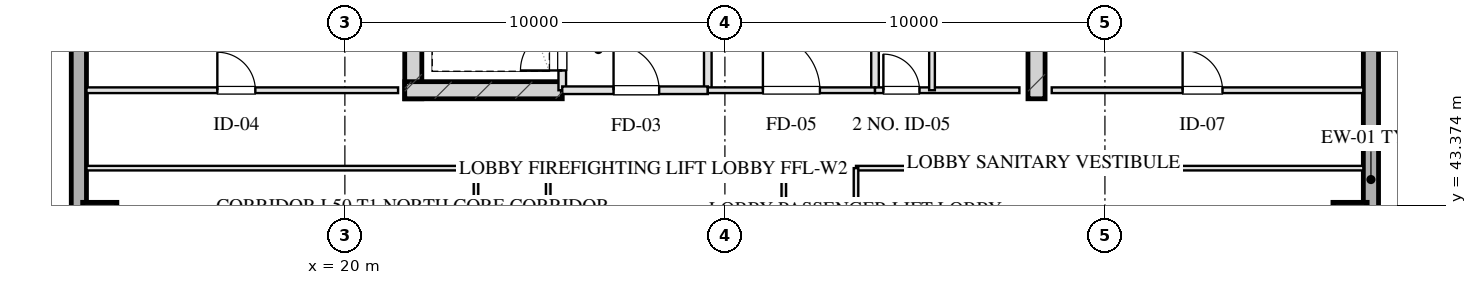
"""IFC4 building model, lengths in metres.
Left out: names, types, materials, properties, quantities, classifications, styles, units other than length and angle.
Written with IfcOpenShell. Run it as: python <this file> out.ifc"""

import sys

from ifc_helpers import new_model, si_unit, direction, frame, frame_2d, origin, origin_2d, place, context, subcontext, project, spatial, rectangle, hollow_rectangle, extrude, element, fill, save


model = new_model("IFC4")
c1 = context("Model", 3, precision=1e-05, world=origin(), true_north=direction((0.0, 1.0)))
c2 = subcontext(c1, "Body", "Model", "MODEL_VIEW")
j1 = project(units=[si_unit("LENGTHUNIT", "METRE"), si_unit("PLANEANGLEUNIT", "RADIAN")], contexts=[c1])
p1 = place(None, origin())
s1 = spatial("IfcSite", under=j1, at=p1, CompositionType="ELEMENT")
p2 = place(p1, origin())
s2 = spatial("IfcBuilding", under=s1, at=p2, CompositionType="ELEMENT")
p3 = place(p2, frame((0.0, 0.0, 188.6)))
s3 = spatial("IfcBuildingStorey", under=s2, at=p3, CompositionType="ELEMENT", Elevation=188.6)
for number, where, z_axis, x_axis in (
    (1, (21.8, 46.175, 0.0), (0.0, 0.0, 1.0), (0.0, 1.0, 0.0)),
    (2, (38.2, 46.175, 0.0), (0.0, 0.0, 1.0), (0.0, 1.0, 0.0)),
):
    element("IfcWall", number, at=place(p3, frame(where, z_axis=z_axis, x_axis=x_axis)), inside=s3, PredefinedType="SHEAR", context=c2, shape_type="SweptSolid", body=[
        extrude(rectangle(XDim=9.33, YDim=0.45, at=frame_2d((4.665, 0.0))), origin(), (0.0, 0.0, 1.0), 3.45),
    ])
p4 = place(p3, frame((21.575, 46.4, 0.0), z_axis=(0.0, 0.0, 1.0), x_axis=(1.0, 0.0, 0.0)))
e3 = element("IfcWall", 3, at=p4, inside=s3, PredefinedType="SHEAR", context=c2, shape_type="SweptSolid", body=[
    extrude(rectangle(XDim=4.145, YDim=0.45, at=frame_2d((2.073, 0.0))), origin(), (0.0, 0.0, 1.0), 3.45),
])
for number, where, z_axis, x_axis in (
    (4, (13.55, 43.0, 0.0), (0.0, 0.0, 1.0), (1.0, 0.0, 0.0)),
    (5, (46.45, 43.0, 0.0), (0.0, 0.0, 1.0), (1.0, 0.0, 0.0)),
):
    element("IfcColumn", number, at=place(p3, frame(where, z_axis=z_axis, x_axis=x_axis)), inside=s3, PredefinedType="COLUMN", context=c2, shape_type="SweptSolid", body=[
        extrude(hollow_rectangle(XDim=0.9, YDim=0.9, WallThickness=0.032, at=origin_2d()), origin(), (0.0, 0.0, 1.0), 3.451),
    ])
p5 = place(p3, frame((13.0, 10.8, 0.0), z_axis=(0.0, 0.0, 1.0), x_axis=(0.0, 1.0, 0.0)))
e6 = element("IfcWall", 6, at=p5, inside=s3, PredefinedType="SOLIDWALL", context=c2, shape_type="SweptSolid", body=[
    extrude(rectangle(XDim=46.4, YDim=0.4, at=frame_2d((23.2, 0.0))), origin(), (0.0, 0.0, 1.0), 2.61),
])
p6 = place(p5, frame((24.75, 0.0, 0.75)))
e7 = element("IfcOpeningElement", 7, at=p6, cuts=e6, PredefinedType="OPENING", context=c2, shape_type="SweptSolid", body=[
    extrude(rectangle(XDim=2.1, YDim=1.46, at=frame_2d((1.05, 0.73))), frame((0.0, 0.21, 0.0), z_axis=(0.0, -1.0, 0.0), x_axis=(1.0, 0.0, 0.0)), (0.0, 0.0, 1.0), 0.42),
])
p7 = place(p5, frame((28.55, 0.0, 0.75)))
e8 = element("IfcOpeningElement", 8, at=p7, cuts=e6, PredefinedType="OPENING", context=c2, shape_type="SweptSolid", body=[
    extrude(rectangle(XDim=2.1, YDim=1.46, at=frame_2d((1.05, 0.73))), frame((0.0, 0.21, 0.0), z_axis=(0.0, -1.0, 0.0), x_axis=(1.0, 0.0, 0.0)), (0.0, 0.0, 1.0), 0.42),
])
p8 = place(p5, frame((19.55, 0.0, 0.0)))
e9 = element("IfcOpeningElement", 9, at=p8, cuts=e6, PredefinedType="OPENING", context=c2, shape_type="SweptSolid", body=[
    extrude(rectangle(XDim=1.1, YDim=2.15, at=frame_2d((0.55, 1.075))), frame((0.0, 0.21, 0.0), z_axis=(0.0, -1.0, 0.0), x_axis=(1.0, 0.0, 0.0)), (0.0, 0.0, 1.0), 0.42),
])
p9 = place(p3, frame((47.0, 57.2, 0.0), z_axis=(0.0, 0.0, 1.0), x_axis=(0.0, -1.0, 0.0)))
e10 = element("IfcWall", 10, at=p9, inside=s3, PredefinedType="SOLIDWALL", context=c2, shape_type="SweptSolid", body=[
    extrude(rectangle(XDim=46.4, YDim=0.4, at=frame_2d((23.2, 0.0))), origin(), (0.0, 0.0, 1.0), 2.61),
])
p10 = place(p9, frame((19.55, 0.0, 0.75)))
e11 = element("IfcOpeningElement", 11, at=p10, cuts=e10, PredefinedType="OPENING", context=c2, shape_type="SweptSolid", body=[
    extrude(rectangle(XDim=2.1, YDim=1.46, at=frame_2d((1.05, 0.73))), frame((0.0, 0.21, 0.0), z_axis=(0.0, -1.0, 0.0), x_axis=(1.0, 0.0, 0.0)), (0.0, 0.0, 1.0), 0.42),
])
p11 = place(p9, frame((15.75, 0.0, 0.75)))
e12 = element("IfcOpeningElement", 12, at=p11, cuts=e10, PredefinedType="OPENING", context=c2, shape_type="SweptSolid", body=[
    extrude(rectangle(XDim=2.1, YDim=1.46, at=frame_2d((1.05, 0.73))), frame((0.0, 0.21, 0.0), z_axis=(0.0, -1.0, 0.0), x_axis=(1.0, 0.0, 0.0)), (0.0, 0.0, 1.0), 0.42),
])
p12 = place(p9, frame((27.05, 0.0, 0.0)))
e13 = element("IfcOpeningElement", 13, at=p12, cuts=e10, PredefinedType="OPENING", context=c2, shape_type="SweptSolid", body=[
    extrude(rectangle(XDim=1.1, YDim=2.15, at=frame_2d((0.55, 1.075))), frame((0.0, 0.21, 0.0), z_axis=(0.0, -1.0, 0.0), x_axis=(1.0, 0.0, 0.0)), (0.0, 0.0, 1.0), 0.42),
])
p13 = place(p3, frame((25.72, 46.4, 0.0), z_axis=(0.0, 0.0, 1.0), x_axis=(0.0, 1.0, 0.0)))
e14 = element("IfcWall", 14, at=p13, inside=s3, PredefinedType="PARTITIONING", context=c2, shape_type="SweptSolid", body=[
    extrude(rectangle(XDim=1.9, YDim=0.2, at=frame_2d((0.95, 0.0))), origin(), (0.0, 0.0, 1.0), 3.175),
])
p14 = place(p13, frame((0.52, 0.0, 0.0)))
e15 = element("IfcOpeningElement", 15, at=p14, cuts=e14, PredefinedType="OPENING", context=c2, shape_type="SweptSolid", body=[
    extrude(rectangle(XDim=1.1, YDim=2.05, at=frame_2d((0.55, 1.025))), frame((0.0, 0.11, 0.0), z_axis=(0.0, -1.0, 0.0), x_axis=(1.0, 0.0, 0.0)), (0.0, 0.0, 1.0), 0.22),
])
p15 = place(p3, frame((29.55, 46.4, 0.0), z_axis=(0.0, 0.0, 1.0), x_axis=(0.0, 1.0, 0.0)))
e16 = element("IfcWall", 16, at=p15, inside=s3, PredefinedType="PARTITIONING", context=c2, shape_type="SweptSolid", body=[
    extrude(rectangle(XDim=8.43, YDim=0.2, at=frame_2d((4.215, 0.0))), origin(), (0.0, 0.0, 1.0), 3.175),
])
p16 = place(p3, frame((25.72, 46.4, 0.0), z_axis=(0.0, 0.0, 1.0), x_axis=(1.0, 0.0, 0.0)))
e17 = element("IfcWall", 17, at=p16, inside=s3, PredefinedType="PARTITIONING", context=c2, shape_type="SweptSolid", body=[
    extrude(rectangle(XDim=3.83, YDim=0.2, at=frame_2d((1.915, 0.0))), origin(), (0.0, 0.0, 1.0), 3.175),
])
p17 = place(p16, frame((1.35, 0.0, 0.0)))
e18 = element("IfcOpeningElement", 18, at=p17, cuts=e17, PredefinedType="OPENING", context=c2, shape_type="SweptSolid", body=[
    extrude(rectangle(XDim=1.2, YDim=2.05, at=frame_2d((0.6, 1.025))), frame((0.0, 0.11, 0.0), z_axis=(0.0, -1.0, 0.0), x_axis=(1.0, 0.0, 0.0)), (0.0, 0.0, 1.0), 0.22),
])
p18 = place(p3, frame((33.95, 46.4, 0.0), z_axis=(0.0, 0.0, 1.0), x_axis=(0.0, 1.0, 0.0)))
e19 = element("IfcWall", 19, at=p18, inside=s3, PredefinedType="PARTITIONING", context=c2, shape_type="SweptSolid", body=[
    extrude(rectangle(XDim=8.43, YDim=0.2, at=frame_2d((4.215, 0.0))), origin(), (0.0, 0.0, 1.0), 3.175),
])
p19 = place(p3, frame((29.55, 46.4, 0.0), z_axis=(0.0, 0.0, 1.0), x_axis=(1.0, 0.0, 0.0)))
e20 = element("IfcWall", 20, at=p19, inside=s3, PredefinedType="PARTITIONING", context=c2, shape_type="SweptSolid", body=[
    extrude(rectangle(XDim=4.4, YDim=0.15, at=frame_2d((2.2, 0.0))), origin(), (0.0, 0.0, 1.0), 3.175),
])
p20 = place(p19, frame((1.45, 0.0, 0.0)))
e21 = element("IfcOpeningElement", 21, at=p20, cuts=e20, PredefinedType="OPENING", context=c2, shape_type="SweptSolid", body=[
    extrude(rectangle(XDim=1.5, YDim=2.05, at=frame_2d((0.75, 1.025))), frame((0.0, 0.085, 0.0), z_axis=(0.0, -1.0, 0.0), x_axis=(1.0, 0.0, 0.0)), (0.0, 0.0, 1.0), 0.17),
])
p21 = place(p3, frame((33.95, 46.4, 0.0), z_axis=(0.0, 0.0, 1.0), x_axis=(1.0, 0.0, 0.0)))
e22 = element("IfcWall", 22, at=p21, inside=s3, PredefinedType="PARTITIONING", context=c2, shape_type="SweptSolid", body=[
    extrude(rectangle(XDim=3.8, YDim=0.15, at=frame_2d((1.9, 0.0))), origin(), (0.0, 0.0, 1.0), 3.175),
])
p22 = place(p21, frame((0.22, 0.0, 0.0)))
e23 = element("IfcOpeningElement", 23, at=p22, cuts=e22, PredefinedType="OPENING", context=c2, shape_type="SweptSolid", body=[
    extrude(rectangle(XDim=0.95, YDim=2.05, at=frame_2d((0.475, 1.025))), frame((0.0, 0.085, 0.0), z_axis=(0.0, -1.0, 0.0), x_axis=(1.0, 0.0, 0.0)), (0.0, 0.0, 1.0), 0.17),
])
p23 = place(p3, frame((35.45, 46.4, 0.0), z_axis=(0.0, 0.0, 1.0), x_axis=(0.0, 1.0, 0.0)))
e24 = element("IfcWall", 24, at=p23, inside=s3, PredefinedType="PARTITIONING", context=c2, shape_type="SweptSolid", body=[
    extrude(rectangle(XDim=8.43, YDim=0.15, at=frame_2d((4.215, 0.0))), origin(), (0.0, 0.0, 1.0), 2.765),
])
p24 = place(p23, frame((2.55, 0.0, 0.0)))
e25 = element("IfcOpeningElement", 25, at=p24, cuts=e24, PredefinedType="OPENING", context=c2, shape_type="SweptSolid", body=[
    extrude(rectangle(XDim=0.95, YDim=2.05, at=frame_2d((0.475, 1.025))), frame((0.0, 0.085, 0.0), z_axis=(0.0, -1.0, 0.0), x_axis=(1.0, 0.0, 0.0)), (0.0, 0.0, 1.0), 0.17),
])
p25 = place(p23, frame((4.7, 0.0, 0.0)))
e26 = element("IfcOpeningElement", 26, at=p25, cuts=e24, PredefinedType="OPENING", context=c2, shape_type="SweptSolid", body=[
    extrude(rectangle(XDim=0.9, YDim=2.05, at=frame_2d((0.45, 1.025))), frame((0.0, 0.085, 0.0), z_axis=(0.0, -1.0, 0.0), x_axis=(1.0, 0.0, 0.0)), (0.0, 0.0, 1.0), 0.17),
])
p26 = place(p23, frame((6.8, 0.0, 0.0)))
e27 = element("IfcOpeningElement", 27, at=p26, cuts=e24, PredefinedType="OPENING", context=c2, shape_type="SweptSolid", body=[
    extrude(rectangle(XDim=0.9, YDim=2.05, at=frame_2d((0.45, 1.025))), frame((0.0, 0.085, 0.0), z_axis=(0.0, -1.0, 0.0), x_axis=(1.0, 0.0, 0.0)), (0.0, 0.0, 1.0), 0.17),
])
p27 = place(p3, frame((13.2, 46.4, 0.0), z_axis=(0.0, 0.0, 1.0), x_axis=(1.0, 0.0, 0.0)))
e28 = element("IfcWall", 28, at=p27, inside=s3, PredefinedType="PARTITIONING", context=c2, shape_type="SweptSolid", body=[
    extrude(rectangle(XDim=8.2, YDim=0.15, at=frame_2d((4.1, 0.0))), origin(), (0.0, 0.0, 1.0), 3.175),
])
p28 = place(p27, frame((3.444, 0.0, 0.0)))
e29 = element("IfcOpeningElement", 29, at=p28, cuts=e28, PredefinedType="OPENING", context=c2, shape_type="SweptSolid", body=[
    extrude(rectangle(XDim=1.0, YDim=2.05, at=frame_2d((0.5, 1.025))), frame((0.0, 0.085, 0.0), z_axis=(0.0, -1.0, 0.0), x_axis=(1.0, 0.0, 0.0)), (0.0, 0.0, 1.0), 0.17),
])
p29 = place(p3, frame((38.6, 46.4, 0.0), z_axis=(0.0, 0.0, 1.0), x_axis=(1.0, 0.0, 0.0)))
e30 = element("IfcWall", 30, at=p29, inside=s3, PredefinedType="PARTITIONING", context=c2, shape_type="SweptSolid", body=[
    extrude(rectangle(XDim=8.2, YDim=0.15, at=frame_2d((4.1, 0.0))), origin(), (0.0, 0.0, 1.0), 3.175),
])
p30 = place(p29, frame((3.444, 0.0, 0.0)))
e31 = element("IfcOpeningElement", 31, at=p30, cuts=e30, PredefinedType="OPENING", context=c2, shape_type="SweptSolid", body=[
    extrude(rectangle(XDim=1.05, YDim=2.05, at=frame_2d((0.525, 1.025))), frame((0.0, 0.085, 0.0), z_axis=(0.0, -1.0, 0.0), x_axis=(1.0, 0.0, 0.0)), (0.0, 0.0, 1.0), 0.17),
])
p31 = place(p3, frame((13.2, 44.35, 0.0), z_axis=(0.0, 0.0, 1.0), x_axis=(1.0, 0.0, 0.0)))
e32 = element("IfcWall", 32, at=p31, inside=s3, PredefinedType="PARTITIONING", context=c2, shape_type="SweptSolid", body=[
    extrude(rectangle(XDim=10.25, YDim=0.12, at=frame_2d((5.125, 0.0))), origin(), (0.0, 0.0, 1.0), 3.175),
])
p32 = place(p3, frame((25.35, 44.35, 0.0), z_axis=(0.0, 0.0, 1.0), x_axis=(1.0, 0.0, 0.0)))
e33 = element("IfcWall", 33, at=p32, inside=s3, PredefinedType="PARTITIONING", context=c2, shape_type="SweptSolid", body=[
    extrude(rectangle(XDim=6.2, YDim=0.12, at=frame_2d((3.1, 0.0))), origin(), (0.0, 0.0, 1.0), 3.175),
])
p33 = place(p3, frame((33.45, 44.35, 0.0), z_axis=(0.0, 0.0, 1.0), x_axis=(1.0, 0.0, 0.0)))
e34 = element("IfcWall", 34, at=p33, inside=s3, PredefinedType="PARTITIONING", context=c2, shape_type="SweptSolid", body=[
    extrude(rectangle(XDim=13.35, YDim=0.12, at=frame_2d((6.675, 0.0))), origin(), (0.0, 0.0, 1.0), 3.175),
])
p34 = place(p3, frame((23.45, 23.65, 0.0), z_axis=(0.0, 0.0, 1.0), x_axis=(0.0, 1.0, 0.0)))
e35 = element("IfcWall", 35, at=p34, inside=s3, PredefinedType="PARTITIONING", context=c2, shape_type="SweptSolid", body=[
    extrude(rectangle(XDim=20.7, YDim=0.12, at=frame_2d((10.35, 0.0))), origin(), (0.0, 0.0, 1.0), 3.175),
])
p35 = place(p34, frame((2.175, 0.0, 0.0)))
e36 = element("IfcOpeningElement", 36, at=p35, cuts=e35, PredefinedType="OPENING", context=c2, shape_type="SweptSolid", body=[
    extrude(rectangle(XDim=1.0, YDim=2.05, at=frame_2d((0.5, 1.025))), frame((0.0, 0.07, 0.0), z_axis=(0.0, -1.0, 0.0), x_axis=(1.0, 0.0, 0.0)), (0.0, 0.0, 1.0), 0.14),
])
p36 = place(p34, frame((6.883, 0.0, 0.0)))
e37 = element("IfcOpeningElement", 37, at=p36, cuts=e35, PredefinedType="OPENING", context=c2, shape_type="SweptSolid", body=[
    extrude(rectangle(XDim=1.0, YDim=2.05, at=frame_2d((0.5, 1.025))), frame((0.0, 0.07, 0.0), z_axis=(0.0, -1.0, 0.0), x_axis=(1.0, 0.0, 0.0)), (0.0, 0.0, 1.0), 0.14),
])
p37 = place(p34, frame((11.502, 0.0, 0.0)))
e38 = element("IfcOpeningElement", 38, at=p37, cuts=e35, PredefinedType="OPENING", context=c2, shape_type="SweptSolid", body=[
    extrude(rectangle(XDim=1.0, YDim=2.05, at=frame_2d((0.5, 1.025))), frame((0.0, 0.07, 0.0), z_axis=(0.0, -1.0, 0.0), x_axis=(1.0, 0.0, 0.0)), (0.0, 0.0, 1.0), 0.14),
])
p38 = place(p34, frame((17.145, 0.0, 0.0)))
e39 = element("IfcOpeningElement", 39, at=p38, cuts=e35, PredefinedType="OPENING", context=c2, shape_type="SweptSolid", body=[
    extrude(rectangle(XDim=0.85, YDim=2.05, at=frame_2d((0.425, 1.025))), frame((0.0, 0.07, 0.0), z_axis=(0.0, -1.0, 0.0), x_axis=(1.0, 0.0, 0.0)), (0.0, 0.0, 1.0), 0.14),
])
p39 = place(p3, frame((25.35, 23.65, 0.0), z_axis=(0.0, 0.0, 1.0), x_axis=(0.0, 1.0, 0.0)))
e40 = element("IfcWall", 40, at=p39, inside=s3, PredefinedType="PARTITIONING", context=c2, shape_type="SweptSolid", body=[
    extrude(rectangle(XDim=20.7, YDim=0.12, at=frame_2d((10.35, 0.0))), origin(), (0.0, 0.0, 1.0), 3.175),
])
p40 = place(p39, frame((4.963, 0.0, 0.0)))
e41 = element("IfcOpeningElement", 41, at=p40, cuts=e40, PredefinedType="OPENING", context=c2, shape_type="SweptSolid", body=[
    extrude(rectangle(XDim=1.1, YDim=2.05, at=frame_2d((0.55, 1.025))), frame((0.0, 0.07, 0.0), z_axis=(0.0, -1.0, 0.0), x_axis=(1.0, 0.0, 0.0)), (0.0, 0.0, 1.0), 0.14),
])
p41 = place(p39, frame((15.382, 0.0, 0.0)))
e42 = element("IfcOpeningElement", 42, at=p41, cuts=e40, PredefinedType="OPENING", context=c2, shape_type="SweptSolid", body=[
    extrude(rectangle(XDim=1.1, YDim=2.05, at=frame_2d((0.55, 1.025))), frame((0.0, 0.07, 0.0), z_axis=(0.0, -1.0, 0.0), x_axis=(1.0, 0.0, 0.0)), (0.0, 0.0, 1.0), 0.14),
])
p42 = place(p3, frame((31.55, 23.65, 0.0), z_axis=(0.0, 0.0, 1.0), x_axis=(0.0, 1.0, 0.0)))
e43 = element("IfcWall", 43, at=p42, inside=s3, PredefinedType="PARTITIONING", context=c2, shape_type="SweptSolid", body=[
    extrude(rectangle(XDim=20.7, YDim=0.12, at=frame_2d((10.35, 0.0))), origin(), (0.0, 0.0, 1.0), 3.175),
])
p43 = place(p3, frame((33.45, 23.65, 0.0), z_axis=(0.0, 0.0, 1.0), x_axis=(0.0, 1.0, 0.0)))
e44 = element("IfcWall", 44, at=p43, inside=s3, PredefinedType="PARTITIONING", context=c2, shape_type="SweptSolid", body=[
    extrude(rectangle(XDim=20.7, YDim=0.12, at=frame_2d((10.35, 0.0))), origin(), (0.0, 0.0, 1.0), 3.175),
])
p44 = place(p43, frame((0.775, 0.0, 0.0)))
e45 = element("IfcOpeningElement", 45, at=p44, cuts=e44, PredefinedType="OPENING", context=c2, shape_type="SweptSolid", body=[
    extrude(rectangle(XDim=1.05, YDim=2.05, at=frame_2d((0.525, 1.025))), frame((0.0, 0.07, 0.0), z_axis=(0.0, -1.0, 0.0), x_axis=(1.0, 0.0, 0.0)), (0.0, 0.0, 1.0), 0.14),
])
p45 = place(p43, frame((5.35, 0.0, 0.0)))
e46 = element("IfcOpeningElement", 46, at=p45, cuts=e44, PredefinedType="OPENING", context=c2, shape_type="SweptSolid", body=[
    extrude(rectangle(XDim=1.0, YDim=2.05, at=frame_2d((0.5, 1.025))), frame((0.0, 0.07, 0.0), z_axis=(0.0, -1.0, 0.0), x_axis=(1.0, 0.0, 0.0)), (0.0, 0.0, 1.0), 0.14),
])
p46 = place(p43, frame((9.85, 0.0, 0.0)))
e47 = element("IfcOpeningElement", 47, at=p46, cuts=e44, PredefinedType="OPENING", context=c2, shape_type="SweptSolid", body=[
    extrude(rectangle(XDim=1.0, YDim=2.05, at=frame_2d((0.5, 1.025))), frame((0.0, 0.07, 0.0), z_axis=(0.0, -1.0, 0.0), x_axis=(1.0, 0.0, 0.0)), (0.0, 0.0, 1.0), 0.14),
])
p47 = place(p43, frame((12.95, 0.0, 0.0)))
e48 = element("IfcOpeningElement", 48, at=p47, cuts=e44, PredefinedType="OPENING", context=c2, shape_type="SweptSolid", body=[
    extrude(rectangle(XDim=1.0, YDim=2.05, at=frame_2d((0.5, 1.025))), frame((0.0, 0.07, 0.0), z_axis=(0.0, -1.0, 0.0), x_axis=(1.0, 0.0, 0.0)), (0.0, 0.0, 1.0), 0.14),
])
p48 = place(p43, frame((17.525, 0.0, 0.0)))
e49 = element("IfcOpeningElement", 49, at=p48, cuts=e44, PredefinedType="OPENING", context=c2, shape_type="SweptSolid", body=[
    extrude(rectangle(XDim=1.0, YDim=2.05, at=frame_2d((0.5, 1.025))), frame((0.0, 0.07, 0.0), z_axis=(0.0, -1.0, 0.0), x_axis=(1.0, 0.0, 0.0)), (0.0, 0.0, 1.0), 0.14),
])
p49 = place(p14, origin())
e50 = element("IfcDoor", 50, at=p49, inside=s3, OperationType="SINGLE_SWING_LEFT", PredefinedType="DOOR", context=c2, shape_type="SweptSolid", body=[
    extrude(rectangle(XDim=1.1, YDim=2.05, at=frame_2d((0.55, 1.025))), frame((0.0, 0.025, 0.0), z_axis=(0.0, -1.0, 0.0), x_axis=(1.0, 0.0, 0.0)), (0.0, 0.0, 1.0), 0.05),
])
fill(e15, e50)
p50 = place(p17, origin())
e51 = element("IfcDoor", 51, at=p50, inside=s3, OperationType="SINGLE_SWING_LEFT", PredefinedType="DOOR", context=c2, shape_type="SweptSolid", body=[
    extrude(rectangle(XDim=1.2, YDim=2.05, at=frame_2d((0.6, 1.025))), frame((0.0, 0.025, 0.0), z_axis=(0.0, -1.0, 0.0), x_axis=(1.0, 0.0, 0.0)), (0.0, 0.0, 1.0), 0.05),
])
fill(e18, e51)
p51 = place(p20, origin())
e52 = element("IfcDoor", 52, at=p51, inside=s3, OperationType="SINGLE_SWING_LEFT", PredefinedType="DOOR", context=c2, shape_type="SweptSolid", body=[
    extrude(rectangle(XDim=1.5, YDim=2.05, at=frame_2d((0.75, 1.025))), frame((0.0, 0.025, 0.0), z_axis=(0.0, -1.0, 0.0), x_axis=(1.0, 0.0, 0.0)), (0.0, 0.0, 1.0), 0.05),
])
fill(e21, e52)
p52 = place(p22, origin())
e53 = element("IfcDoor", 53, at=p52, inside=s3, OperationType="SINGLE_SWING_LEFT", PredefinedType="DOOR", context=c2, shape_type="SweptSolid", body=[
    extrude(rectangle(XDim=0.95, YDim=2.05, at=frame_2d((0.475, 1.025))), frame((0.0, 0.025, 0.0), z_axis=(0.0, -1.0, 0.0), x_axis=(1.0, 0.0, 0.0)), (0.0, 0.0, 1.0), 0.05),
])
fill(e23, e53)
p53 = place(p28, origin())
e54 = element("IfcDoor", 54, at=p53, inside=s3, OperationType="SINGLE_SWING_LEFT", PredefinedType="DOOR", context=c2, shape_type="SweptSolid", body=[
    extrude(rectangle(XDim=1.0, YDim=2.05, at=frame_2d((0.5, 1.025))), frame((0.0, 0.025, 0.0), z_axis=(0.0, -1.0, 0.0), x_axis=(1.0, 0.0, 0.0)), (0.0, 0.0, 1.0), 0.05),
])
fill(e29, e54)
p54 = place(p30, origin())
e55 = element("IfcDoor", 55, at=p54, inside=s3, OperationType="SINGLE_SWING_LEFT", PredefinedType="DOOR", context=c2, shape_type="SweptSolid", body=[
    extrude(rectangle(XDim=1.05, YDim=2.05, at=frame_2d((0.525, 1.025))), frame((0.0, 0.025, 0.0), z_axis=(0.0, -1.0, 0.0), x_axis=(1.0, 0.0, 0.0)), (0.0, 0.0, 1.0), 0.05),
])
fill(e31, e55)
save(model, sys.argv[1])
